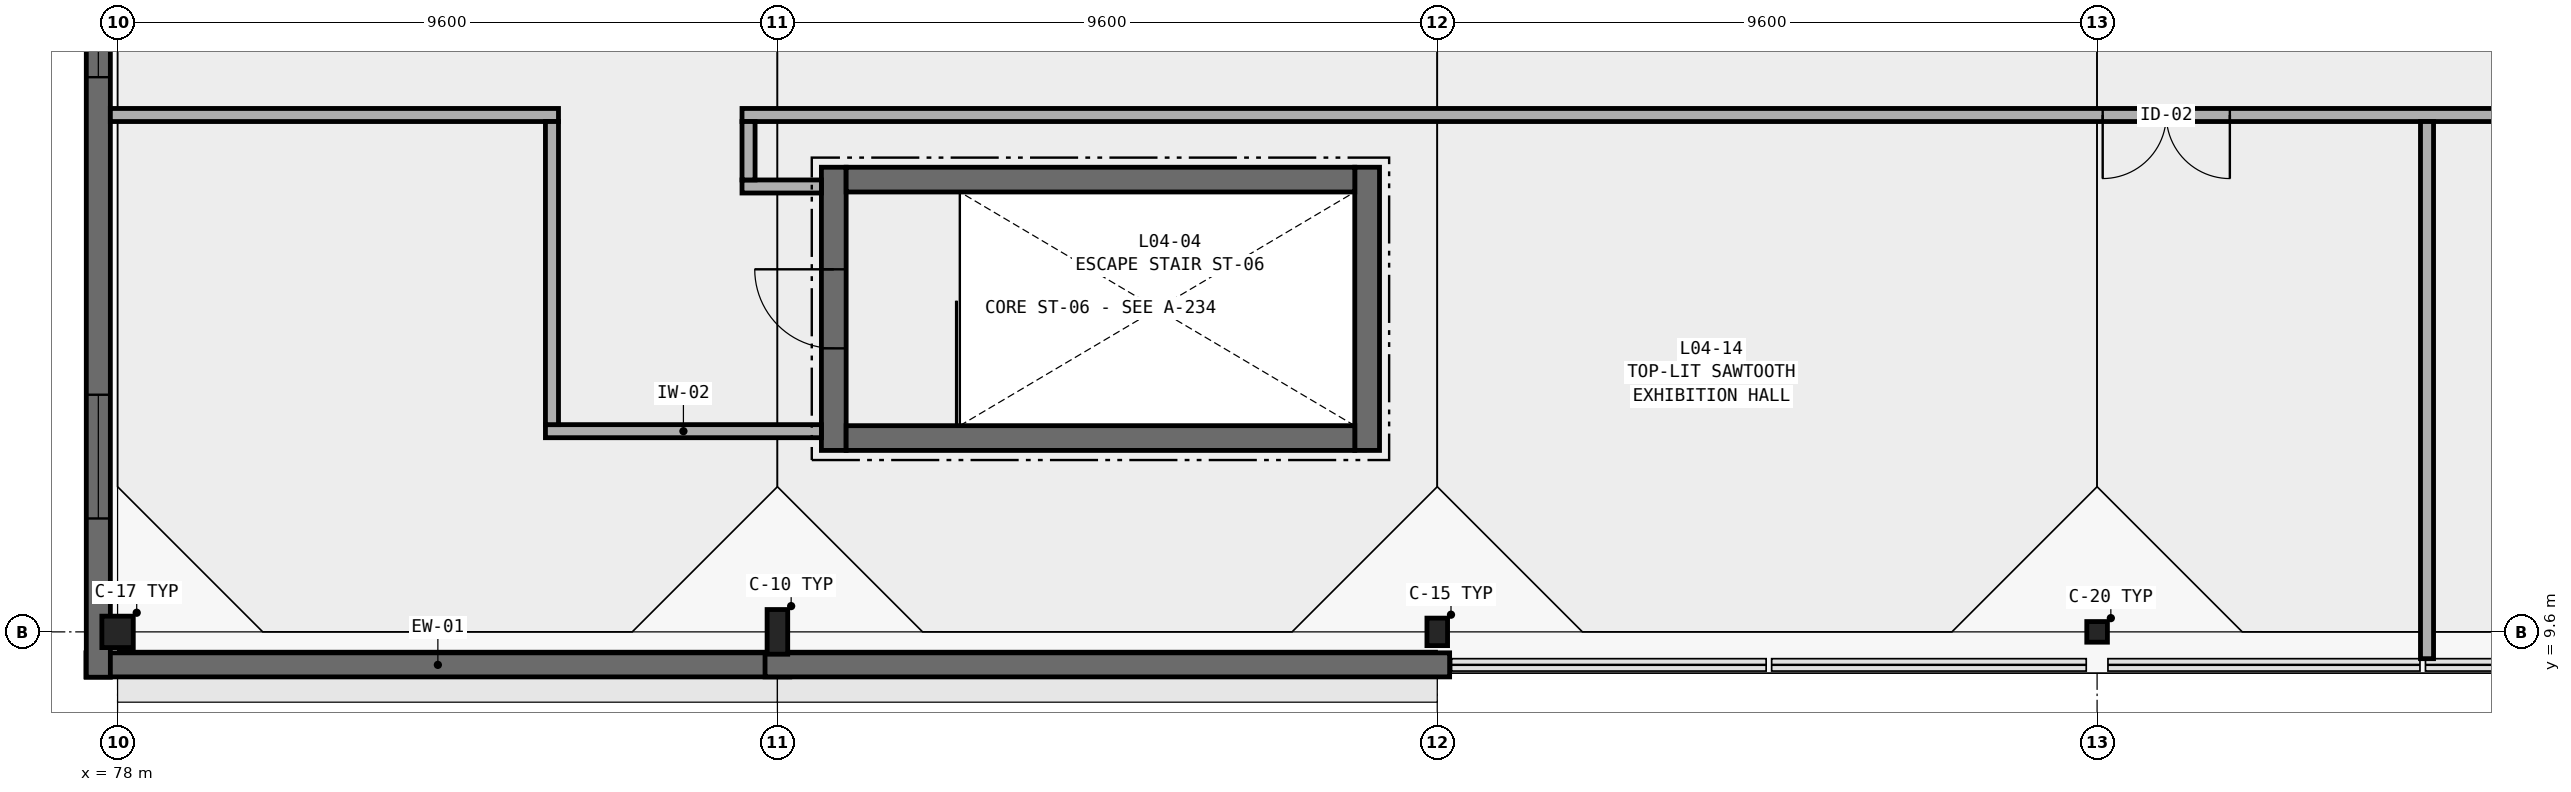
"""IFC4 building model, lengths in metres.
Left out: names, types, materials, properties, quantities, classifications, styles, units other than length and angle.
Written with IfcOpenShell. Run it as: python <this file> out.ifc"""

import sys

from ifc_helpers import new_model, si_unit, direction, frame, frame_2d, origin, origin_2d, place, context, subcontext, project, spatial, rectangle, hollow_rectangle, hollow_circle, i_section, extrude, element, fill, save


model = new_model("IFC4")
c1 = context("Model", 3, precision=1e-05, world=origin(), true_north=direction((0.0, 1.0)))
c2 = subcontext(c1, "Body", "Model", "MODEL_VIEW")
j1 = project(units=[si_unit("LENGTHUNIT", "METRE"), si_unit("PLANEANGLEUNIT", "RADIAN")], contexts=[c1])
p1 = place(None, origin())
s1 = spatial("IfcSite", under=j1, at=p1, CompositionType="ELEMENT")
p2 = place(p1, origin())
s2 = spatial("IfcBuilding", under=s1, at=p2, CompositionType="ELEMENT")
p3 = place(p2, frame((0.0, 0.0, 21.3)))
s3 = spatial("IfcBuildingStorey", under=s2, at=p3, CompositionType="ELEMENT", Elevation=21.3)
p4 = place(p3, frame((78.0, 9.6, 0.0), z_axis=(0.0, 0.0, 1.0), x_axis=(1.0, 0.0, 0.0)))
e1 = element("IfcColumn", 1, at=p4, inside=s3, PredefinedType="COLUMN", context=c2, shape_type="SweptSolid", body=[
    extrude(hollow_circle(Radius=0.229, WallThickness=0.02, at=origin_2d()), origin(), (0.0, 0.0, 1.0), 4.2),
])
p5 = place(p3, frame((87.6, 9.6, 0.0), z_axis=(0.0, 0.0, 1.0), x_axis=(1.0, 0.0, 0.0)))
e2 = element("IfcColumn", 2, at=p5, inside=s3, PredefinedType="COLUMN", context=c2, shape_type="SweptSolid", body=[
    extrude(i_section(OverallWidth=0.3, OverallDepth=0.65, WebThickness=0.016, FlangeThickness=0.031, FilletRadius=0.027, at=origin_2d()), origin(), (0.0, 0.0, 1.0), 4.2),
])
p6 = place(p3, frame((97.2, 9.6, 0.0), z_axis=(0.0, 0.0, 1.0), x_axis=(1.0, 0.0, 0.0)))
e3 = element("IfcColumn", 3, at=p6, inside=s3, PredefinedType="COLUMN", context=c2, shape_type="SweptSolid", body=[
    extrude(i_section(OverallWidth=0.3, OverallDepth=0.4, WebThickness=0.013, FlangeThickness=0.024, FilletRadius=0.027, at=origin_2d()), origin(), (0.0, 0.0, 1.0), 4.2),
])
p7 = place(p3, frame((106.8, 9.6, 0.0), z_axis=(0.0, 0.0, 1.0), x_axis=(1.0, 0.0, 0.0)))
e4 = element("IfcColumn", 4, at=p7, inside=s3, PredefinedType="COLUMN", context=c2, shape_type="SweptSolid", body=[
    extrude(hollow_rectangle(XDim=0.3, YDim=0.3, WallThickness=0.016, at=origin_2d()), origin(), (0.0, 0.0, 1.0), 4.2),
])
p8 = place(p3, frame((77.54, 9.12, 0.0), z_axis=(0.0, 0.0, 1.0), x_axis=(1.0, 0.0, 0.0)))
e5 = element("IfcWall", 5, at=p8, inside=s3, PredefinedType="STANDARD", context=c2, shape_type="SweptSolid", body=[
    extrude(rectangle(XDim=10.24, YDim=0.35, at=frame_2d((5.12, 0.0))), origin(), (0.0, 0.0, 1.0), 3.9),
])
p9 = place(p3, frame((87.42, 9.12, 0.0), z_axis=(0.0, 0.0, 1.0), x_axis=(1.0, 0.0, 0.0)))
e6 = element("IfcWall", 6, at=p9, inside=s3, PredefinedType="STANDARD", context=c2, shape_type="SweptSolid", body=[
    extrude(rectangle(XDim=9.96, YDim=0.35, at=frame_2d((4.98, 0.0))), origin(), (0.0, 0.0, 1.0), 3.9),
])
p10 = place(p3, frame((77.72, 21.78, 0.0), z_axis=(0.0, 0.0, 1.0), x_axis=(0.0, -1.0, 0.0)))
e7 = element("IfcWall", 7, at=p10, inside=s3, PredefinedType="STANDARD", context=c2, shape_type="SweptSolid", body=[
    extrude(rectangle(XDim=12.84, YDim=0.35, at=frame_2d((6.42, 0.0))), origin(), (0.0, 0.0, 1.0), 3.9),
])
p11 = place(p10, frame((2.31, 0.0, 1.8)))
e8 = element("IfcOpeningElement", 8, at=p11, cuts=e7, PredefinedType="OPENING", context=c2, shape_type="SweptSolid", body=[
    extrude(rectangle(XDim=1.8, YDim=1.1, at=frame_2d((0.9, 0.55))), frame((0.0, 0.19, 0.0), z_axis=(0.0, -1.0, 0.0), x_axis=(1.0, 0.0, 0.0)), (0.0, 0.0, 1.0), 0.38),
])
p12 = place(p10, frame((8.73, 0.0, 1.8)))
e9 = element("IfcOpeningElement", 9, at=p12, cuts=e7, PredefinedType="OPENING", context=c2, shape_type="SweptSolid", body=[
    extrude(rectangle(XDim=1.8, YDim=1.1, at=frame_2d((0.9, 0.55))), frame((0.0, 0.19, 0.0), z_axis=(0.0, -1.0, 0.0), x_axis=(1.0, 0.0, 0.0)), (0.0, 0.0, 1.0), 0.38),
])
p13 = place(p3, frame((88.42, 12.24, 0.0), z_axis=(0.0, 0.0, 1.0), x_axis=(0.0, 1.0, 0.0)))
e10 = element("IfcWall", 10, at=p13, inside=s3, PredefinedType="SHEAR", context=c2, shape_type="SweptSolid", body=[
    extrude(rectangle(XDim=4.12, YDim=0.36, at=frame_2d((2.06, 0.0))), origin(), (0.0, 0.0, 1.0), 3.95),
])
p14 = place(p13, frame((1.485, 0.0, 0.0)))
e11 = element("IfcOpeningElement", 11, at=p14, cuts=e10, PredefinedType="OPENING", context=c2, shape_type="SweptSolid", body=[
    extrude(rectangle(XDim=1.15, YDim=2.15, at=frame_2d((0.575, 1.075))), frame((0.0, 0.195, 0.0), z_axis=(0.0, -1.0, 0.0), x_axis=(1.0, 0.0, 0.0)), (0.0, 0.0, 1.0), 0.39),
])
p15 = place(p3, frame((96.18, 12.24, 0.0), z_axis=(0.0, 0.0, 1.0), x_axis=(0.0, 1.0, 0.0)))
e12 = element("IfcWall", 12, at=p15, inside=s3, PredefinedType="SHEAR", context=c2, shape_type="SweptSolid", body=[
    extrude(rectangle(XDim=4.12, YDim=0.36, at=frame_2d((2.06, 0.0))), origin(), (0.0, 0.0, 1.0), 3.95),
])
for number, where, z_axis, x_axis in (
    (13, (88.6, 16.18, 0.0), (0.0, 0.0, 1.0), (1.0, 0.0, 0.0)),
    (14, (88.6, 12.42, 0.0), (0.0, 0.0, 1.0), (1.0, 0.0, 0.0)),
):
    element("IfcWall", number, at=place(p3, frame(where, z_axis=z_axis, x_axis=x_axis)), inside=s3, PredefinedType="SHEAR", context=c2, shape_type="SweptSolid", body=[
        extrude(rectangle(XDim=7.4, YDim=0.36, at=frame_2d((3.7, 0.0))), origin(), (0.0, 0.0, 1.0), 3.95),
    ])
p16 = place(p3, frame((84.225, 12.52, 0.0), z_axis=(0.0, 0.0, 1.0), x_axis=(1.0, 0.0, 0.0)))
e15 = element("IfcWall", 15, at=p16, inside=s3, PredefinedType="PARTITIONING", context=c2, shape_type="SweptSolid", body=[
    extrude(rectangle(XDim=4.015, YDim=0.19, at=frame_2d((2.007, 0.0))), origin(), (0.0, 0.0, 1.0), 2.83),
])
p17 = place(p3, frame((87.085, 16.08, 0.0), z_axis=(0.0, 0.0, 1.0), x_axis=(1.0, 0.0, 0.0)))
e16 = element("IfcWall", 16, at=p17, inside=s3, PredefinedType="PARTITIONING", context=c2, shape_type="SweptSolid", body=[
    extrude(rectangle(XDim=1.155, YDim=0.19, at=frame_2d((0.578, 0.0))), origin(), (0.0, 0.0, 1.0), 2.83),
])
p18 = place(p3, frame((77.895, 17.12, 0.0), z_axis=(0.0, 0.0, 1.0), x_axis=(1.0, 0.0, 0.0)))
e17 = element("IfcWall", 17, at=p18, inside=s3, PredefinedType="PARTITIONING", context=c2, shape_type="SweptSolid", body=[
    extrude(rectangle(XDim=6.52, YDim=0.19, at=frame_2d((3.26, 0.0))), origin(), (0.0, 0.0, 1.0), 2.83),
])
p19 = place(p3, frame((87.085, 17.12, 0.0), z_axis=(0.0, 0.0, 1.0), x_axis=(1.0, 0.0, 0.0)))
e18 = element("IfcWall", 18, at=p19, inside=s3, PredefinedType="PARTITIONING", context=c2, shape_type="SweptSolid", body=[
    extrude(rectangle(XDim=54.53, YDim=0.19, at=frame_2d((27.265, 0.0))), origin(), (0.0, 0.0, 1.0), 2.83),
])
p20 = place(p19, frame((19.796, 0.0, 0.0)))
e19 = element("IfcOpeningElement", 19, at=p20, cuts=e18, PredefinedType="OPENING", context=c2, shape_type="SweptSolid", body=[
    extrude(rectangle(XDim=1.85, YDim=2.35, at=frame_2d((0.925, 1.175))), frame((0.0, 0.11, 0.0), z_axis=(0.0, -1.0, 0.0), x_axis=(1.0, 0.0, 0.0)), (0.0, 0.0, 1.0), 0.22),
])
p21 = place(p19, frame((26.34, 0.0, 0.0)))
e20 = element("IfcOpeningElement", 20, at=p21, cuts=e18, PredefinedType="OPENING", context=c2, shape_type="SweptSolid", body=[
    extrude(rectangle(XDim=1.85, YDim=2.35, at=frame_2d((0.925, 1.175))), frame((0.0, 0.11, 0.0), z_axis=(0.0, -1.0, 0.0), x_axis=(1.0, 0.0, 0.0)), (0.0, 0.0, 1.0), 0.22),
])
p22 = place(p3, frame((84.32, 12.615, 0.0), z_axis=(0.0, 0.0, 1.0), x_axis=(0.0, 1.0, 0.0)))
e21 = element("IfcWall", 21, at=p22, inside=s3, PredefinedType="PARTITIONING", context=c2, shape_type="SweptSolid", body=[
    extrude(rectangle(XDim=4.41, YDim=0.19, at=frame_2d((2.205, 0.0))), origin(), (0.0, 0.0, 1.0), 2.83),
])
p23 = place(p3, frame((87.18, 16.175, 0.0), z_axis=(0.0, 0.0, 1.0), x_axis=(0.0, 1.0, 0.0)))
e22 = element("IfcWall", 22, at=p23, inside=s3, PredefinedType="PARTITIONING", context=c2, shape_type="SweptSolid", body=[
    extrude(rectangle(XDim=0.85, YDim=0.19, at=frame_2d((0.425, 0.0))), origin(), (0.0, 0.0, 1.0), 2.83),
])
p24 = place(p3, frame((111.6, 9.21, 0.0), z_axis=(0.0, 0.0, 1.0), x_axis=(0.0, 1.0, 0.0)))
e23 = element("IfcWall", 23, at=p24, inside=s3, PredefinedType="PARTITIONING", context=c2, shape_type="SweptSolid", body=[
    extrude(rectangle(XDim=7.815, YDim=0.19, at=frame_2d((3.907, 0.0))), origin(), (0.0, 0.0, 1.0), 2.83),
])
p25 = place(p11, origin())
e24 = element("IfcWindow", 24, at=p25, inside=s3, PartitioningType="SINGLE_PANEL", PredefinedType="WINDOW", context=c2, shape_type="SweptSolid", body=[
    extrude(rectangle(XDim=1.8, YDim=1.1, at=frame_2d((0.9, 0.55))), frame((0.0, 0.03, 0.0), z_axis=(0.0, -1.0, 0.0), x_axis=(1.0, 0.0, 0.0)), (0.0, 0.0, 1.0), 0.06),
])
fill(e8, e24)
p26 = place(p12, origin())
e25 = element("IfcWindow", 25, at=p26, inside=s3, PartitioningType="SINGLE_PANEL", PredefinedType="WINDOW", context=c2, shape_type="SweptSolid", body=[
    extrude(rectangle(XDim=1.8, YDim=1.1, at=frame_2d((0.9, 0.55))), frame((0.0, 0.03, 0.0), z_axis=(0.0, -1.0, 0.0), x_axis=(1.0, 0.0, 0.0)), (0.0, 0.0, 1.0), 0.06),
])
fill(e9, e25)
p27 = place(p14, origin())
e26 = element("IfcDoor", 26, at=p27, inside=s3, OperationType="SINGLE_SWING_RIGHT", PredefinedType="DOOR", context=c2, shape_type="SweptSolid", body=[
    extrude(rectangle(XDim=1.15, YDim=2.15, at=frame_2d((0.575, 1.075))), frame((0.0, 0.025, 0.0), z_axis=(0.0, -1.0, 0.0), x_axis=(1.0, 0.0, 0.0)), (0.0, 0.0, 1.0), 0.05),
])
fill(e11, e26)
p28 = place(p20, frame((1.85, 0.0, 0.0), z_axis=(0.0, 0.0, 1.0), x_axis=(-1.0, 0.0, 0.0)))
e27 = element("IfcDoor", 27, at=p28, inside=s3, OperationType="DOUBLE_DOOR_SINGLE_SWING", PredefinedType="DOOR", context=c2, shape_type="SweptSolid", body=[
    extrude(rectangle(XDim=1.85, YDim=2.35, at=frame_2d((0.925, 1.175))), frame((0.0, 0.025, 0.0), z_axis=(0.0, -1.0, 0.0), x_axis=(1.0, 0.0, 0.0)), (0.0, 0.0, 1.0), 0.05),
])
fill(e19, e27)
save(model, sys.argv[1])
